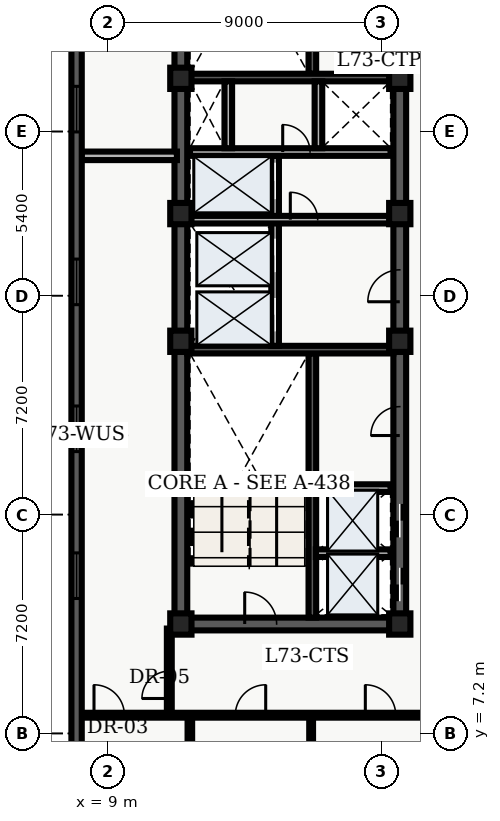
"""IFC4 building model, lengths in metres.
Left out: names, types, materials, properties, quantities, classifications, styles, units other than length and angle.
Written with IfcOpenShell. Run it as: python <this file> out.ifc"""

import sys

from ifc_helpers import new_model, entity, si_unit, converted_unit, direction, frame, origin_with_axes, origin_2d_with_axis, place, context, subcontext, project, spatial, polyline, rectangle, outline, extrude, element, fill, save


model = new_model("IFC4")
c1 = context("Model", 3, precision=1e-05, world=origin_with_axes(), true_north=direction((0.0, 1.0)))
c2 = subcontext(c1, "Body", "Model", "MODEL_VIEW")
j1 = project(units=[si_unit("LENGTHUNIT", "METRE"), converted_unit("PLANEANGLEUNIT", "DEGREE", entity("IfcPlaneAngleMeasure", 0.017), si_unit("PLANEANGLEUNIT", "RADIAN"), dimensions=[0, 0, 0, 0, 0, 0, 0])], contexts=[c1])
p1 = place(None, origin_with_axes())
s1 = spatial("IfcSite", under=j1, at=p1, CompositionType="ELEMENT")
p2 = place(p1, origin_with_axes())
s2 = spatial("IfcBuilding", under=s1, at=p2, CompositionType="ELEMENT")
p3 = place(p2, frame((0.0, 0.0, 295.8), z_axis=(0.0, 0.0, 1.0), x_axis=(1.0, 0.0, 0.0)))
s3 = spatial("IfcBuildingStorey", under=s2, at=p3, CompositionType="ELEMENT", Elevation=295.8)
p4 = place(p3, frame((11.4, 10.8, 0.0), z_axis=(0.0, 0.0, 1.0), x_axis=(0.0, 1.0, 0.0)))
e1 = element("IfcWall", 1, at=p4, inside=s3, PredefinedType="SHEAR", context=c2, shape_type="SweptSolid", body=[
    extrude(outline(polyline([(0.0, -0.21), (27.0, -0.21), (27.0, 0.21), (0.0, 0.21), (0.0, -0.21)])), origin_with_axes(), (0.0, 0.0, 1.0), 3.66),
])
p5 = place(p3, frame((11.4, 10.8, 0.0), z_axis=(0.0, 0.0, 1.0), x_axis=(1.0, 0.0, 0.0)))
e2 = element("IfcWall", 2, at=p5, inside=s3, PredefinedType="SHEAR", context=c2, shape_type="SweptSolid", body=[
    extrude(outline(polyline([(0.0, -0.21), (7.2, -0.21), (7.2, 0.21), (0.0, 0.21), (0.0, -0.21)])), origin_with_axes(), (0.0, 0.0, 1.0), 3.66),
])
p6 = place(p5, frame((2.625, 0.0, 0.0), z_axis=(0.0, 0.0, 1.0), x_axis=(1.0, 0.0, 0.0)))
e3 = element("IfcOpeningElement", 3, at=p6, cuts=e2, PredefinedType="OPENING", context=c2, shape_type="SweptSolid", body=[
    extrude(rectangle(XDim=1.05, YDim=0.44, at=origin_2d_with_axis()), origin_with_axes(), (0.0, 0.0, 1.0), 2.15),
])
p7 = place(p3, frame((18.6, 10.8, 0.0), z_axis=(0.0, 0.0, 1.0), x_axis=(0.0, 1.0, 0.0)))
e4 = element("IfcWall", 4, at=p7, inside=s3, PredefinedType="SHEAR", context=c2, shape_type="SweptSolid", body=[
    extrude(outline(polyline([(0.0, -0.21), (13.5, -0.21), (13.5, 0.21), (0.0, 0.21), (0.0, -0.21)])), origin_with_axes(), (0.0, 0.0, 1.0), 3.66),
])
p8 = place(p7, frame((1.3, 0.0, 0.0), z_axis=(0.0, 0.0, 1.0), x_axis=(1.0, 0.0, 0.0)))
e5 = element("IfcOpeningElement", 5, at=p8, cuts=e4, PredefinedType="OPENING", context=c2, shape_type="SweptSolid", body=[
    extrude(rectangle(XDim=1.1, YDim=0.44, at=origin_2d_with_axis()), origin_with_axes(), (0.0, 0.0, 1.0), 2.15),
])
p9 = place(p7, frame((3.4, 0.0, 0.0), z_axis=(0.0, 0.0, 1.0), x_axis=(1.0, 0.0, 0.0)))
e6 = element("IfcOpeningElement", 6, at=p9, cuts=e4, PredefinedType="OPENING", context=c2, shape_type="SweptSolid", body=[
    extrude(rectangle(XDim=1.1, YDim=0.44, at=origin_2d_with_axis()), origin_with_axes(), (0.0, 0.0, 1.0), 2.15),
])
p10 = place(p7, frame((11.125, 0.0, 0.0), z_axis=(0.0, 0.0, 1.0), x_axis=(1.0, 0.0, 0.0)))
e7 = element("IfcOpeningElement", 7, at=p10, cuts=e4, PredefinedType="OPENING", context=c2, shape_type="SweptSolid", body=[
    extrude(rectangle(XDim=1.05, YDim=0.44, at=origin_2d_with_axis()), origin_with_axes(), (0.0, 0.0, 1.0), 2.15),
])
p11 = place(p7, frame((6.675, 0.0, 0.0), z_axis=(0.0, 0.0, 1.0), x_axis=(1.0, 0.0, 0.0)))
e8 = element("IfcOpeningElement", 8, at=p11, cuts=e4, PredefinedType="OPENING", context=c2, shape_type="SweptSolid", body=[
    extrude(rectangle(XDim=0.95, YDim=0.44, at=origin_2d_with_axis()), origin_with_axes(), (0.0, 0.0, 1.0), 2.15),
])
p12 = place(p3, frame((18.6, 24.3, 0.0), z_axis=(0.0, 0.0, 1.0), x_axis=(0.0, 1.0, 0.0)))
e9 = element("IfcWall", 9, at=p12, inside=s3, PredefinedType="SHEAR", context=c2, shape_type="SweptSolid", body=[
    extrude(outline(polyline([(0.0, -0.21), (13.5, -0.21), (13.5, 0.21), (0.0, 0.21), (0.0, -0.21)])), origin_with_axes(), (0.0, 0.0, 1.0), 3.66),
])
p13 = place(p12, frame((8.525, 0.0, 0.0), z_axis=(0.0, 0.0, 1.0), x_axis=(1.0, 0.0, 0.0)))
e10 = element("IfcOpeningElement", 10, at=p13, cuts=e9, PredefinedType="OPENING", context=c2, shape_type="SweptSolid", body=[
    extrude(rectangle(XDim=1.05, YDim=0.44, at=origin_2d_with_axis()), origin_with_axes(), (0.0, 0.0, 1.0), 2.15),
])
p14 = place(p3, frame((15.725, 11.01, 0.0), z_axis=(0.0, 0.0, 1.0), x_axis=(0.0, 1.0, 0.0)))
e11 = element("IfcWall", 11, at=p14, inside=s3, PredefinedType="SHEAR", context=c2, shape_type="SweptSolid", body=[
    extrude(outline(polyline([(0.0, -0.125), (8.69, -0.125), (8.69, 0.125), (0.0, 0.125), (0.0, -0.125)])), origin_with_axes(), (0.0, 0.0, 1.0), 3.66),
])
p15 = place(p3, frame((11.61, 19.825, 0.0), z_axis=(0.0, 0.0, 1.0), x_axis=(1.0, 0.0, 0.0)))
e12 = element("IfcWall", 12, at=p15, inside=s3, PredefinedType="SHEAR", context=c2, shape_type="SweptSolid", body=[
    extrude(outline(polyline([(0.0, -0.125), (6.78, -0.125), (6.78, 0.125), (0.0, 0.125), (0.0, -0.125)])), origin_with_axes(), (0.0, 0.0, 1.0), 3.66),
])
p16 = place(p3, frame((15.725, 28.9, 0.0), z_axis=(0.0, 0.0, 1.0), x_axis=(0.0, 1.0, 0.0)))
e13 = element("IfcWall", 13, at=p16, inside=s3, PredefinedType="SHEAR", context=c2, shape_type="SweptSolid", body=[
    extrude(outline(polyline([(0.0, -0.125), (8.69, -0.125), (8.69, 0.125), (0.0, 0.125), (0.0, -0.125)])), origin_with_axes(), (0.0, 0.0, 1.0), 3.66),
])
p17 = place(p3, frame((11.61, 28.775, 0.0), z_axis=(0.0, 0.0, 1.0), x_axis=(1.0, 0.0, 0.0)))
e14 = element("IfcWall", 14, at=p17, inside=s3, PredefinedType="SHEAR", context=c2, shape_type="SweptSolid", body=[
    extrude(outline(polyline([(0.0, -0.125), (6.78, -0.125), (6.78, 0.125), (0.0, 0.125), (0.0, -0.125)])), origin_with_axes(), (0.0, 0.0, 1.0), 3.66),
])
p18 = place(p3, frame((14.5, 19.95, 0.0), z_axis=(0.0, 0.0, 1.0), x_axis=(0.0, 1.0, 0.0)))
e15 = element("IfcWall", 15, at=p18, inside=s3, PredefinedType="SOLIDWALL", context=c2, shape_type="SweptSolid", body=[
    extrude(outline(polyline([(0.0, -0.125), (6.25, -0.125), (6.25, 0.125), (0.0, 0.125), (0.0, -0.125)])), origin_with_axes(), (0.0, 0.0, 1.0), 2.7),
])
p19 = place(p18, frame((1.025, 0.0, 0.0), z_axis=(0.0, 0.0, 1.0), x_axis=(1.0, 0.0, 0.0)))
e16 = element("IfcOpeningElement", 16, at=p19, cuts=e15, PredefinedType="OPENING", context=c2, shape_type="SweptSolid", body=[
    extrude(rectangle(XDim=1.1, YDim=0.27, at=origin_2d_with_axis()), origin_with_axes(), (0.0, 0.0, 1.0), 2.15),
])
p20 = place(p18, frame((2.975, 0.0, 0.0), z_axis=(0.0, 0.0, 1.0), x_axis=(1.0, 0.0, 0.0)))
e17 = element("IfcOpeningElement", 17, at=p20, cuts=e15, PredefinedType="OPENING", context=c2, shape_type="SweptSolid", body=[
    extrude(rectangle(XDim=1.1, YDim=0.27, at=origin_2d_with_axis()), origin_with_axes(), (0.0, 0.0, 1.0), 2.15),
])
p21 = place(p18, frame((5.425, 0.0, 0.0), z_axis=(0.0, 0.0, 1.0), x_axis=(1.0, 0.0, 0.0)))
e18 = element("IfcOpeningElement", 18, at=p21, cuts=e15, PredefinedType="OPENING", context=c2, shape_type="SweptSolid", body=[
    extrude(rectangle(XDim=1.2, YDim=0.27, at=origin_2d_with_axis()), origin_with_axes(), (0.0, 0.0, 1.0), 2.15),
])
p22 = place(p3, frame((11.7, 24.1, 0.0), z_axis=(0.0, 0.0, 1.0), x_axis=(1.0, 0.0, 0.0)))
e19 = element("IfcWall", 19, at=p22, inside=s3, PredefinedType="SOLIDWALL", context=c2, shape_type="SweptSolid", body=[
    extrude(outline(polyline([(0.0, -0.125), (6.6, -0.125), (6.6, 0.125), (0.0, 0.125), (0.0, -0.125)])), origin_with_axes(), (0.0, 0.0, 1.0), 2.7),
])
p23 = place(p22, frame((3.75, 0.0, 0.0), z_axis=(0.0, 0.0, 1.0), x_axis=(1.0, 0.0, 0.0)))
e20 = element("IfcOpeningElement", 20, at=p23, cuts=e19, PredefinedType="OPENING", context=c2, shape_type="SweptSolid", body=[
    extrude(rectangle(XDim=0.9, YDim=0.27, at=origin_2d_with_axis()), origin_with_axes(), (0.0, 0.0, 1.0), 2.15),
])
p24 = place(p3, frame((11.7, 26.325, 0.0), z_axis=(0.0, 0.0, 1.0), x_axis=(1.0, 0.0, 0.0)))
e21 = element("IfcWall", 21, at=p24, inside=s3, PredefinedType="SOLIDWALL", context=c2, shape_type="SweptSolid", body=[
    extrude(outline(polyline([(0.0, -0.125), (6.6, -0.125), (6.6, 0.125), (0.0, 0.125), (0.0, -0.125)])), origin_with_axes(), (0.0, 0.0, 1.0), 2.7),
])
p25 = place(p24, frame((3.5, 0.0, 0.0), z_axis=(0.0, 0.0, 1.0), x_axis=(1.0, 0.0, 0.0)))
e22 = element("IfcOpeningElement", 22, at=p25, cuts=e21, PredefinedType="OPENING", context=c2, shape_type="SweptSolid", body=[
    extrude(rectangle(XDim=0.9, YDim=0.27, at=origin_2d_with_axis()), origin_with_axes(), (0.0, 0.0, 1.0), 2.15),
])
for number, where, z_axis, x_axis in (
    (23, (12.96, 26.45, 0.0), (0.0, 0.0, 1.0), (0.0, 1.0, 0.0)),
    (24, (15.925, 26.45, 0.0), (0.0, 0.0, 1.0), (0.0, 1.0, 0.0)),
):
    element("IfcWall", number, at=place(p3, frame(where, z_axis=z_axis, x_axis=x_axis)), inside=s3, PredefinedType="SOLIDWALL", context=c2, shape_type="SweptSolid", body=[
        extrude(outline(polyline([(0.0, -0.125), (2.2, -0.125), (2.2, 0.125), (0.0, 0.125), (0.0, -0.125)])), origin_with_axes(), (0.0, 0.0, 1.0), 2.7),
    ])
for number, where, z_axis, x_axis in (
    (25, (11.4, 10.8, 0.0), (0.0, 0.0, 1.0), (1.0, 0.0, 0.0)),
    (26, (11.4, 20.1, 0.0), (0.0, 0.0, 1.0), (1.0, 0.0, 0.0)),
    (27, (11.4, 24.3, 0.0), (0.0, 0.0, 1.0), (1.0, 0.0, 0.0)),
    (28, (11.4, 28.75, 0.0), (0.0, 0.0, 1.0), (1.0, 0.0, 0.0)),
    (29, (18.6, 10.8, 0.0), (0.0, 0.0, 1.0), (1.0, 0.0, 0.0)),
    (30, (18.6, 20.1, 0.0), (0.0, 0.0, 1.0), (1.0, 0.0, 0.0)),
    (31, (18.6, 24.3, 0.0), (0.0, 0.0, 1.0), (1.0, 0.0, 0.0)),
    (32, (18.6, 28.75, 0.0), (0.0, 0.0, 1.0), (1.0, 0.0, 0.0)),
):
    element("IfcColumn", number, at=place(p3, frame(where, z_axis=z_axis, x_axis=x_axis)), inside=s3, PredefinedType="COLUMN", context=c2, shape_type="SweptSolid", body=[
        extrude(rectangle(XDim=0.7, YDim=0.7, at=origin_2d_with_axis()), origin_with_axes(), (0.0, 0.0, 1.0), 3.9),
    ])
for number, where, z_axis, x_axis in (
    (33, (15.84, 13.13, 0.0), (0.0, 0.0, 1.0), (1.0, 0.0, 0.0)),
    (34, (15.84, 15.27, 0.0), (0.0, 0.0, 1.0), (1.0, 0.0, 0.0)),
):
    element("IfcWall", number, at=place(p3, frame(where, z_axis=z_axis, x_axis=x_axis)), inside=s3, PredefinedType="SOLIDWALL", context=c2, shape_type="SweptSolid", body=[
        extrude(outline(polyline([(0.0, -0.125), (2.46, -0.125), (2.46, 0.125), (0.0, 0.125), (0.0, -0.125)])), origin_with_axes(), (0.0, 0.0, 1.0), 2.7),
    ])
p26 = place(p3, frame((8.135, 7.8, 0.0), z_axis=(0.0, 0.0, 1.0), x_axis=(1.0, 0.0, 0.0)))
e35 = element("IfcWall", 35, at=p26, inside=s3, PredefinedType="PARTITIONING", context=c2, shape_type="SweptSolid", body=[
    extrude(outline(polyline([(0.0, -0.08), (12.165, -0.08), (12.165, 0.08), (0.0, 0.08), (0.0, -0.08)])), origin_with_axes(), (0.0, 0.0, 1.0), 2.7),
])
p27 = place(p26, frame((0.908, 0.0, 0.0), z_axis=(0.0, 0.0, 1.0), x_axis=(1.0, 0.0, 0.0)))
e36 = element("IfcOpeningElement", 36, at=p27, cuts=e35, PredefinedType="OPENING", context=c2, shape_type="SweptSolid", body=[
    extrude(rectangle(XDim=1.0, YDim=0.18, at=origin_2d_with_axis()), origin_with_axes(), (0.0, 0.0, 1.0), 2.15),
])
p28 = place(p26, frame((5.556, 0.0, 0.0), z_axis=(0.0, 0.0, 1.0), x_axis=(1.0, 0.0, 0.0)))
e37 = element("IfcOpeningElement", 37, at=p28, cuts=e35, PredefinedType="OPENING", context=c2, shape_type="SweptSolid", body=[
    extrude(rectangle(XDim=1.0, YDim=0.18, at=origin_2d_with_axis()), origin_with_axes(), (0.0, 0.0, 1.0), 2.15),
])
p29 = place(p26, frame((9.832, 0.0, 0.0), z_axis=(0.0, 0.0, 1.0), x_axis=(1.0, 0.0, 0.0)))
e38 = element("IfcOpeningElement", 38, at=p29, cuts=e35, PredefinedType="OPENING", context=c2, shape_type="SweptSolid", body=[
    extrude(rectangle(XDim=1.0, YDim=0.18, at=origin_2d_with_axis()), origin_with_axes(), (0.0, 0.0, 1.0), 2.15),
])
p30 = place(p3, frame((11.02, 7.8, 0.0), z_axis=(0.0, 0.0, 1.0), x_axis=(0.0, 1.0, 0.0)))
e39 = element("IfcWall", 39, at=p30, inside=s3, PredefinedType="PARTITIONING", context=c2, shape_type="SweptSolid", body=[
    extrude(outline(polyline([(0.0, -0.08), (2.85, -0.08), (2.85, 0.08), (0.0, 0.08), (0.0, -0.08)])), origin_with_axes(), (0.0, 0.0, 1.0), 2.7),
])
p31 = place(p30, frame((1.0, 0.0, 0.0), z_axis=(0.0, 0.0, 1.0), x_axis=(1.0, 0.0, 0.0)))
e40 = element("IfcOpeningElement", 40, at=p31, cuts=e39, PredefinedType="OPENING", context=c2, shape_type="SweptSolid", body=[
    extrude(rectangle(XDim=0.9, YDim=0.18, at=origin_2d_with_axis()), origin_with_axes(), (0.0, 0.0, 1.0), 2.15),
])
p32 = place(p3, frame((8.135, 26.2, 0.0), z_axis=(0.0, 0.0, 1.0), x_axis=(1.0, 0.0, 0.0)))
e41 = element("IfcWall", 41, at=p32, inside=s3, PredefinedType="PARTITIONING", context=c2, shape_type="SweptSolid", body=[
    extrude(outline(polyline([(0.0, -0.14), (3.135, -0.14), (3.135, 0.14), (0.0, 0.14), (0.0, -0.14)])), origin_with_axes(), (0.0, 0.0, 1.0), 2.7),
])
p33 = place(p3, frame((11.696, 2.135, 0.0), z_axis=(0.0, 0.0, 1.0), x_axis=(0.0, 1.0, 0.0)))
e42 = element("IfcWall", 42, at=p33, inside=s3, PredefinedType="PARTITIONING", context=c2, shape_type="SweptSolid", body=[
    extrude(outline(polyline([(0.0, -0.075), (5.565, -0.075), (5.565, 0.075), (0.0, 0.075), (0.0, -0.075)])), origin_with_axes(), (0.0, 0.0, 1.0), 2.7),
])
p34 = place(p3, frame((15.685, 2.135, 0.0), z_axis=(0.0, 0.0, 1.0), x_axis=(0.0, 1.0, 0.0)))
e43 = element("IfcWall", 43, at=p34, inside=s3, PredefinedType="PARTITIONING", context=c2, shape_type="SweptSolid", body=[
    extrude(outline(polyline([(0.0, -0.062), (5.565, -0.062), (5.565, 0.062), (0.0, 0.062), (0.0, -0.062)])), origin_with_axes(), (0.0, 0.0, 1.0), 2.7),
])
p35 = place(p3, frame((7.97, 4.54, 0.0), z_axis=(0.0, 0.0, 1.0), x_axis=(0.0, 1.0, 0.0)))
e44 = element("IfcWall", 44, at=p35, inside=s3, PredefinedType="SOLIDWALL", context=c2, shape_type="SweptSolid", body=[
    extrude(outline(polyline([(0.0, -0.17), (39.86, -0.17), (39.86, 0.17), (0.0, 0.17), (0.0, -0.17)])), origin_with_axes(), (0.0, 0.0, 1.0), 3.66),
])
p36 = place(p35, frame((7.849, 0.0, 0.45), z_axis=(0.0, 0.0, 1.0), x_axis=(1.0, 0.0, 0.0)))
e45 = element("IfcOpeningElement", 45, at=p36, cuts=e44, PredefinedType="OPENING", context=c2, shape_type="SweptSolid", body=[
    extrude(rectangle(XDim=1.5, YDim=0.36, at=origin_2d_with_axis()), origin_with_axes(), (0.0, 0.0, 1.0), 2.1),
])
p37 = place(p35, frame((12.681, 0.0, 0.45), z_axis=(0.0, 0.0, 1.0), x_axis=(1.0, 0.0, 0.0)))
e46 = element("IfcOpeningElement", 46, at=p37, cuts=e44, PredefinedType="OPENING", context=c2, shape_type="SweptSolid", body=[
    extrude(rectangle(XDim=1.5, YDim=0.36, at=origin_2d_with_axis()), origin_with_axes(), (0.0, 0.0, 1.0), 2.1),
])
p38 = place(p35, frame((17.514, 0.0, 0.45), z_axis=(0.0, 0.0, 1.0), x_axis=(1.0, 0.0, 0.0)))
e47 = element("IfcOpeningElement", 47, at=p38, cuts=e44, PredefinedType="OPENING", context=c2, shape_type="SweptSolid", body=[
    extrude(rectangle(XDim=1.5, YDim=0.36, at=origin_2d_with_axis()), origin_with_axes(), (0.0, 0.0, 1.0), 2.1),
])
p39 = place(p35, frame((23.196, 0.0, 0.45), z_axis=(0.0, 0.0, 1.0), x_axis=(1.0, 0.0, 0.0)))
e48 = element("IfcOpeningElement", 48, at=p39, cuts=e44, PredefinedType="OPENING", context=c2, shape_type="SweptSolid", body=[
    extrude(rectangle(XDim=1.5, YDim=0.36, at=origin_2d_with_axis()), origin_with_axes(), (0.0, 0.0, 1.0), 2.1),
])
p40 = place(p35, frame((27.179, 0.0, 0.45), z_axis=(0.0, 0.0, 1.0), x_axis=(1.0, 0.0, 0.0)))
e49 = element("IfcOpeningElement", 49, at=p40, cuts=e44, PredefinedType="OPENING", context=c2, shape_type="SweptSolid", body=[
    extrude(rectangle(XDim=1.5, YDim=0.36, at=origin_2d_with_axis()), origin_with_axes(), (0.0, 0.0, 1.0), 2.1),
])
p41 = place(p35, frame((32.011, 0.0, 0.45), z_axis=(0.0, 0.0, 1.0), x_axis=(1.0, 0.0, 0.0)))
e50 = element("IfcOpeningElement", 50, at=p41, cuts=e44, PredefinedType="OPENING", context=c2, shape_type="SweptSolid", body=[
    extrude(rectangle(XDim=1.5, YDim=0.36, at=origin_2d_with_axis()), origin_with_axes(), (0.0, 0.0, 1.0), 2.1),
])
p42 = place(p35, frame((37.294, 0.0, 0.45), z_axis=(0.0, 0.0, 1.0), x_axis=(1.0, 0.0, 0.0)))
e51 = element("IfcOpeningElement", 51, at=p42, cuts=e44, PredefinedType="OPENING", context=c2, shape_type="SweptSolid", body=[
    extrude(rectangle(XDim=1.5, YDim=0.36, at=origin_2d_with_axis()), origin_with_axes(), (0.0, 0.0, 1.0), 2.1),
])
p43 = place(p7, frame((1.3, 0.0, 0.0), z_axis=(0.0, 0.0, 1.0), x_axis=(1.0, 0.0, 0.0)))
e52 = element("IfcDoor", 52, at=p43, inside=s3, OperationType="SLIDING_TO_LEFT", PredefinedType="DOOR", context=c2, shape_type="SweptSolid", body=[
    extrude(rectangle(XDim=1.1, YDim=0.09, at=origin_2d_with_axis()), origin_with_axes(), (0.0, 0.0, 1.0), 2.15),
])
fill(e5, e52)
p44 = place(p7, frame((3.4, 0.0, 0.0), z_axis=(0.0, 0.0, 1.0), x_axis=(1.0, 0.0, 0.0)))
e53 = element("IfcDoor", 53, at=p44, inside=s3, OperationType="SLIDING_TO_RIGHT", PredefinedType="DOOR", context=c2, shape_type="SweptSolid", body=[
    extrude(rectangle(XDim=1.1, YDim=0.09, at=origin_2d_with_axis()), origin_with_axes(), (0.0, 0.0, 1.0), 2.15),
])
fill(e6, e53)
p45 = place(p18, frame((1.025, 0.0, 0.0), z_axis=(0.0, 0.0, 1.0), x_axis=(1.0, 0.0, 0.0)))
e54 = element("IfcDoor", 54, at=p45, inside=s3, OperationType="SLIDING_TO_LEFT", PredefinedType="DOOR", context=c2, shape_type="SweptSolid", body=[
    extrude(rectangle(XDim=1.1, YDim=0.09, at=origin_2d_with_axis()), origin_with_axes(), (0.0, 0.0, 1.0), 2.15),
])
fill(e16, e54)
p46 = place(p18, frame((2.975, 0.0, 0.0), z_axis=(0.0, 0.0, 1.0), x_axis=(1.0, 0.0, 0.0)))
e55 = element("IfcDoor", 55, at=p46, inside=s3, OperationType="SLIDING_TO_RIGHT", PredefinedType="DOOR", context=c2, shape_type="SweptSolid", body=[
    extrude(rectangle(XDim=1.1, YDim=0.09, at=origin_2d_with_axis()), origin_with_axes(), (0.0, 0.0, 1.0), 2.15),
])
fill(e17, e55)
p47 = place(p18, frame((5.425, 0.0, 0.0), z_axis=(0.0, 0.0, 1.0), x_axis=(1.0, 0.0, 0.0)))
e56 = element("IfcDoor", 56, at=p47, inside=s3, OperationType="DOUBLE_DOOR_SLIDING", PredefinedType="DOOR", context=c2, shape_type="SweptSolid", body=[
    extrude(rectangle(XDim=1.2, YDim=0.09, at=origin_2d_with_axis()), origin_with_axes(), (0.0, 0.0, 1.0), 2.15),
])
fill(e18, e56)
p48 = place(p5, frame((2.625, 0.0, 0.0), z_axis=(0.0, 0.0, 1.0), x_axis=(1.0, 0.0, 0.0)))
e57 = element("IfcDoor", 57, at=p48, inside=s3, OperationType="SINGLE_SWING_LEFT", PredefinedType="DOOR", context=c2, shape_type="SweptSolid", body=[
    extrude(rectangle(XDim=1.05, YDim=0.09, at=origin_2d_with_axis()), origin_with_axes(), (0.0, 0.0, 1.0), 2.15),
])
fill(e3, e57)
p49 = place(p7, frame((11.125, 0.0, 0.0), z_axis=(0.0, 0.0, 1.0), x_axis=(1.0, 0.0, 0.0)))
e58 = element("IfcDoor", 58, at=p49, inside=s3, OperationType="SINGLE_SWING_LEFT", PredefinedType="DOOR", context=c2, shape_type="SweptSolid", body=[
    extrude(rectangle(XDim=1.05, YDim=0.09, at=origin_2d_with_axis()), origin_with_axes(), (0.0, 0.0, 1.0), 2.15),
])
fill(e7, e58)
p50 = place(p22, frame((3.75, 0.0, 0.0), z_axis=(0.0, 0.0, 1.0), x_axis=(1.0, 0.0, 0.0)))
e59 = element("IfcDoor", 59, at=p50, inside=s3, OperationType="SINGLE_SWING_LEFT", PredefinedType="DOOR", context=c2, shape_type="SweptSolid", body=[
    extrude(rectangle(XDim=0.9, YDim=0.09, at=origin_2d_with_axis()), origin_with_axes(), (0.0, 0.0, 1.0), 2.15),
])
fill(e20, e59)
p51 = place(p24, frame((3.5, 0.0, 0.0), z_axis=(0.0, 0.0, 1.0), x_axis=(1.0, 0.0, 0.0)))
e60 = element("IfcDoor", 60, at=p51, inside=s3, OperationType="SINGLE_SWING_LEFT", PredefinedType="DOOR", context=c2, shape_type="SweptSolid", body=[
    extrude(rectangle(XDim=0.9, YDim=0.09, at=origin_2d_with_axis()), origin_with_axes(), (0.0, 0.0, 1.0), 2.15),
])
fill(e22, e60)
p52 = place(p7, frame((6.675, 0.0, 0.0), z_axis=(0.0, 0.0, 1.0), x_axis=(1.0, 0.0, 0.0)))
e61 = element("IfcDoor", 61, at=p52, inside=s3, OperationType="SINGLE_SWING_LEFT", PredefinedType="DOOR", context=c2, shape_type="SweptSolid", body=[
    extrude(rectangle(XDim=0.95, YDim=0.09, at=origin_2d_with_axis()), origin_with_axes(), (0.0, 0.0, 1.0), 2.15),
])
fill(e8, e61)
p53 = place(p30, frame((1.0, 0.0, 0.0), z_axis=(0.0, 0.0, 1.0), x_axis=(1.0, 0.0, 0.0)))
e62 = element("IfcDoor", 62, at=p53, inside=s3, OperationType="SINGLE_SWING_LEFT", PredefinedType="DOOR", context=c2, shape_type="SweptSolid", body=[
    extrude(rectangle(XDim=0.9, YDim=0.09, at=origin_2d_with_axis()), origin_with_axes(), (0.0, 0.0, 1.0), 2.15),
])
fill(e40, e62)
p54 = place(p26, frame((0.908, 0.0, 0.0), z_axis=(0.0, 0.0, 1.0), x_axis=(1.0, 0.0, 0.0)))
e63 = element("IfcDoor", 63, at=p54, inside=s3, OperationType="SINGLE_SWING_LEFT", PredefinedType="DOOR", context=c2, shape_type="SweptSolid", body=[
    extrude(rectangle(XDim=1.0, YDim=0.09, at=origin_2d_with_axis()), origin_with_axes(), (0.0, 0.0, 1.0), 2.15),
])
fill(e36, e63)
p55 = place(p26, frame((5.556, 0.0, 0.0), z_axis=(0.0, 0.0, 1.0), x_axis=(1.0, 0.0, 0.0)))
e64 = element("IfcDoor", 64, at=p55, inside=s3, OperationType="SINGLE_SWING_RIGHT", PredefinedType="DOOR", context=c2, shape_type="SweptSolid", body=[
    extrude(rectangle(XDim=1.0, YDim=0.09, at=origin_2d_with_axis()), origin_with_axes(), (0.0, 0.0, 1.0), 2.15),
])
fill(e37, e64)
p56 = place(p26, frame((9.832, 0.0, 0.0), z_axis=(0.0, 0.0, 1.0), x_axis=(1.0, 0.0, 0.0)))
e65 = element("IfcDoor", 65, at=p56, inside=s3, OperationType="SINGLE_SWING_LEFT", PredefinedType="DOOR", context=c2, shape_type="SweptSolid", body=[
    extrude(rectangle(XDim=1.0, YDim=0.09, at=origin_2d_with_axis()), origin_with_axes(), (0.0, 0.0, 1.0), 2.15),
])
fill(e38, e65)
p57 = place(p35, frame((7.849, 0.0, 0.45), z_axis=(0.0, 0.0, 1.0), x_axis=(1.0, 0.0, 0.0)))
e66 = element("IfcWindow", 66, at=p57, inside=s3, PredefinedType="WINDOW", context=c2, shape_type="SweptSolid", body=[
    extrude(rectangle(XDim=1.5, YDim=0.09, at=origin_2d_with_axis()), origin_with_axes(), (0.0, 0.0, 1.0), 2.1),
])
fill(e45, e66)
p58 = place(p35, frame((12.681, 0.0, 0.45), z_axis=(0.0, 0.0, 1.0), x_axis=(1.0, 0.0, 0.0)))
e67 = element("IfcWindow", 67, at=p58, inside=s3, PredefinedType="WINDOW", context=c2, shape_type="SweptSolid", body=[
    extrude(rectangle(XDim=1.5, YDim=0.09, at=origin_2d_with_axis()), origin_with_axes(), (0.0, 0.0, 1.0), 2.1),
])
fill(e46, e67)
p59 = place(p35, frame((17.514, 0.0, 0.45), z_axis=(0.0, 0.0, 1.0), x_axis=(1.0, 0.0, 0.0)))
e68 = element("IfcWindow", 68, at=p59, inside=s3, PredefinedType="WINDOW", context=c2, shape_type="SweptSolid", body=[
    extrude(rectangle(XDim=1.5, YDim=0.09, at=origin_2d_with_axis()), origin_with_axes(), (0.0, 0.0, 1.0), 2.1),
])
fill(e47, e68)
p60 = place(p35, frame((23.196, 0.0, 0.45), z_axis=(0.0, 0.0, 1.0), x_axis=(1.0, 0.0, 0.0)))
e69 = element("IfcWindow", 69, at=p60, inside=s3, PredefinedType="WINDOW", context=c2, shape_type="SweptSolid", body=[
    extrude(rectangle(XDim=1.5, YDim=0.09, at=origin_2d_with_axis()), origin_with_axes(), (0.0, 0.0, 1.0), 2.1),
])
fill(e48, e69)
save(model, sys.argv[1])
